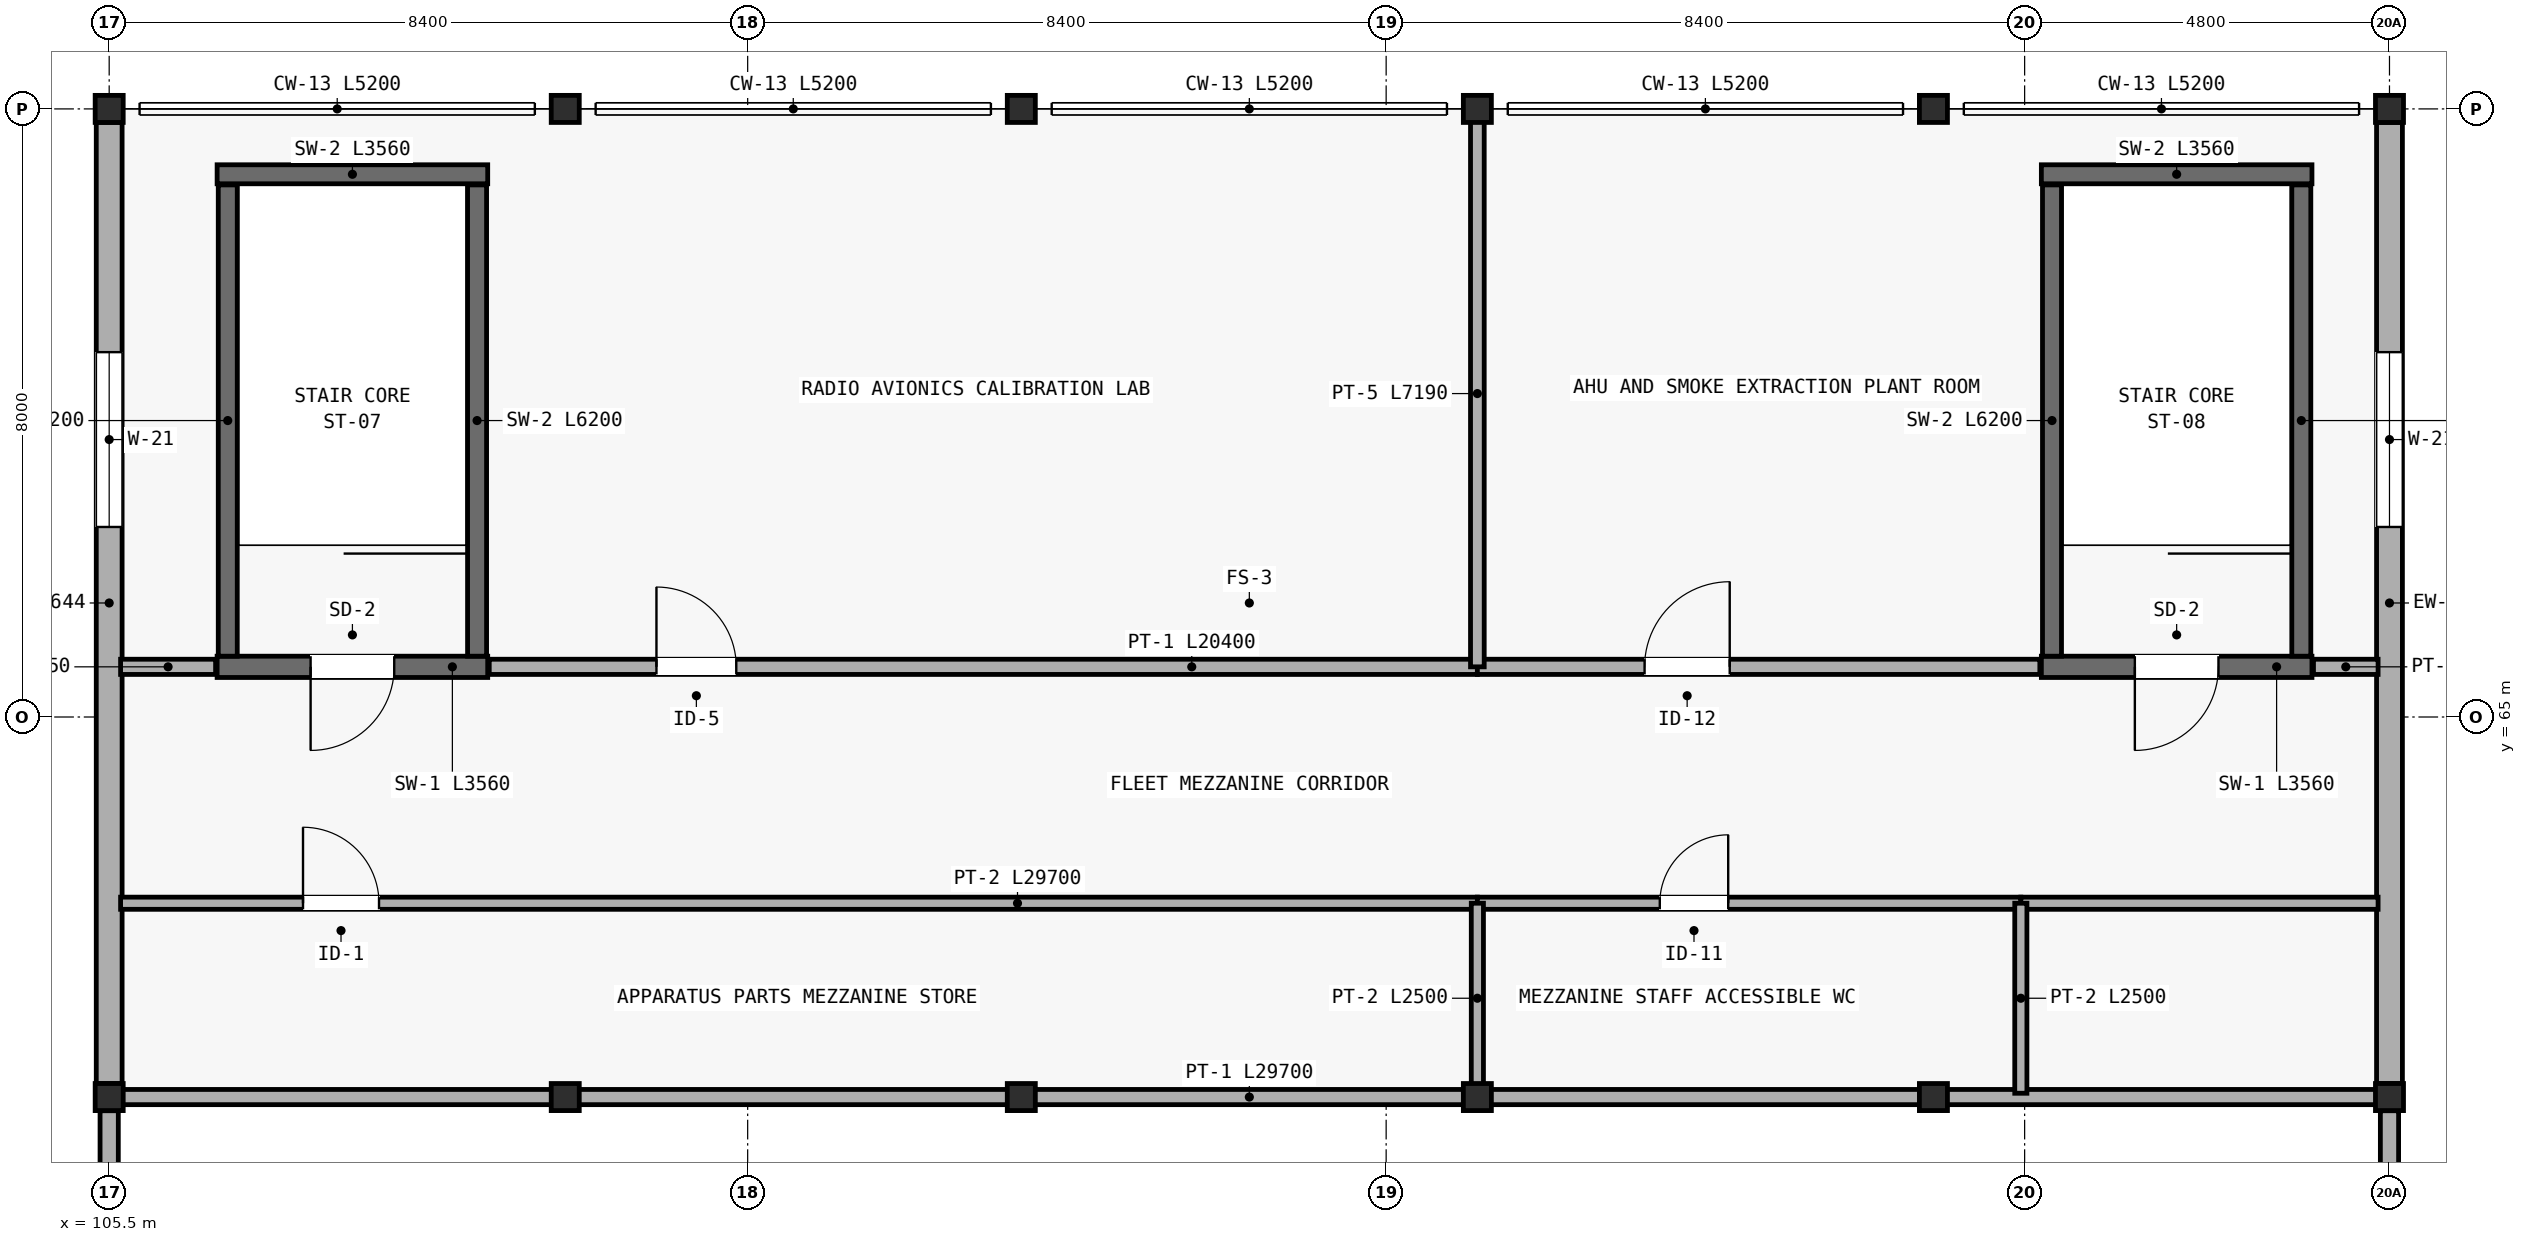
"""IFC4 building model, lengths in metres.
Left out: names, types, materials, properties, quantities, classifications, styles, units other than length and angle.
Written with IfcOpenShell. Run it as: python <this file> out.ifc"""

import sys

from ifc_helpers import new_model, si_unit, direction, frame, frame_2d, origin, origin_2d, place, context, subcontext, project, spatial, rectangle, i_section, extrude, element, fill, save


model = new_model("IFC4")
c1 = context("Model", 3, precision=1e-05, world=origin(), true_north=direction((0.0, 1.0)))
c2 = subcontext(c1, "Body", "Model", "MODEL_VIEW")
j1 = project(units=[si_unit("LENGTHUNIT", "METRE"), si_unit("PLANEANGLEUNIT", "RADIAN")], contexts=[c1])
p1 = place(None, origin())
s1 = spatial("IfcSite", under=j1, at=p1, CompositionType="ELEMENT")
p2 = place(p1, origin())
s2 = spatial("IfcBuilding", under=s1, at=p2, CompositionType="ELEMENT")
p3 = place(p2, frame((0.0, 0.0, 5.85)))
s3 = spatial("IfcBuildingStorey", under=s2, at=p3, CompositionType="ELEMENT", Elevation=5.85)
for number, where, z_axis, x_axis in (
    (1, (105.5, 60.0, 0.0), (0.0, 0.0, 1.0), (1.0, 0.0, 0.0)),
    (2, (105.5, 73.0, 0.0), (0.0, 0.0, 1.0), (1.0, 0.0, 0.0)),
    (3, (111.5, 60.0, 0.0), (0.0, 0.0, 1.0), (1.0, 0.0, 0.0)),
    (4, (111.5, 73.0, 0.0), (0.0, 0.0, 1.0), (1.0, 0.0, 0.0)),
    (5, (117.5, 60.0, 0.0), (0.0, 0.0, 1.0), (1.0, 0.0, 0.0)),
    (6, (117.5, 73.0, 0.0), (0.0, 0.0, 1.0), (1.0, 0.0, 0.0)),
    (7, (123.5, 60.0, 0.0), (0.0, 0.0, 1.0), (1.0, 0.0, 0.0)),
    (8, (123.5, 73.0, 0.0), (0.0, 0.0, 1.0), (1.0, 0.0, 0.0)),
    (9, (129.5, 60.0, 0.0), (0.0, 0.0, 1.0), (1.0, 0.0, 0.0)),
    (10, (129.5, 73.0, 0.0), (0.0, 0.0, 1.0), (1.0, 0.0, 0.0)),
    (11, (135.5, 60.0, 0.0), (0.0, 0.0, 1.0), (1.0, 0.0, 0.0)),
    (12, (135.5, 73.0, 0.0), (0.0, 0.0, 1.0), (1.0, 0.0, 0.0)),
):
    element("IfcColumn", number, at=place(p3, frame(where, z_axis=z_axis, x_axis=x_axis)), inside=s3, PredefinedType="COLUMN", context=c2, shape_type="SweptSolid", body=[
        extrude(i_section(OverallWidth=0.369, OverallDepth=0.356, WebThickness=0.011, FlangeThickness=0.018, FilletRadius=0.015, at=origin_2d()), origin(), (0.0, 0.0, 1.0), 3.45),
    ])
p4 = place(p3, frame((105.5, 48.18, -0.25), z_axis=(0.0, 0.0, 1.0), x_axis=(0.0, 1.0, 0.0)))
e13 = element("IfcWall", 13, at=p4, inside=s3, PredefinedType="STANDARD", context=c2, shape_type="SweptSolid", body=[
    extrude(rectangle(XDim=11.64, YDim=0.24, at=frame_2d((5.82, 0.0))), origin(), (0.0, 0.0, 1.0), 1.8),
])
p5 = place(p3, frame((105.5, 60.178, 0.0), z_axis=(0.0, 0.0, 1.0), x_axis=(0.0, 1.0, 0.0)))
e14 = element("IfcWall", 14, at=p5, inside=s3, PredefinedType="STANDARD", context=c2, shape_type="SweptSolid", body=[
    extrude(rectangle(XDim=12.644, YDim=0.34, at=frame_2d((6.322, 0.0))), origin(), (0.0, 0.0, 1.0), 2.419),
])
p6 = place(p5, frame((7.322, 0.0, 0.8)))
e15 = element("IfcOpeningElement", 15, at=p6, cuts=e14, PredefinedType="OPENING", context=c2, shape_type="SweptSolid", body=[
    extrude(rectangle(XDim=2.3, YDim=1.35, at=frame_2d((1.15, 0.675))), frame((0.0, 0.18, 0.0), z_axis=(0.0, -1.0, 0.0), x_axis=(1.0, 0.0, 0.0)), (0.0, 0.0, 1.0), 0.36),
])
p7 = place(p3, frame((135.5, 48.18, -0.25), z_axis=(0.0, 0.0, 1.0), x_axis=(0.0, 1.0, 0.0)))
e16 = element("IfcWall", 16, at=p7, inside=s3, PredefinedType="STANDARD", context=c2, shape_type="SweptSolid", body=[
    extrude(rectangle(XDim=11.64, YDim=0.24, at=frame_2d((5.82, 0.0))), origin(), (0.0, 0.0, 1.0), 1.8),
])
p8 = place(p3, frame((135.5, 60.178, 0.0), z_axis=(0.0, 0.0, 1.0), x_axis=(0.0, 1.0, 0.0)))
e17 = element("IfcWall", 17, at=p8, inside=s3, PredefinedType="STANDARD", context=c2, shape_type="SweptSolid", body=[
    extrude(rectangle(XDim=12.644, YDim=0.34, at=frame_2d((6.322, 0.0))), origin(), (0.0, 0.0, 1.0), 2.419),
])
p9 = place(p8, frame((7.322, 0.0, 0.8)))
e18 = element("IfcOpeningElement", 18, at=p9, cuts=e17, PredefinedType="OPENING", context=c2, shape_type="SweptSolid", body=[
    extrude(rectangle(XDim=2.3, YDim=1.35, at=frame_2d((1.15, 0.675))), frame((0.0, 0.18, 0.0), z_axis=(0.0, -1.0, 0.0), x_axis=(1.0, 0.0, 0.0)), (0.0, 0.0, 1.0), 0.36),
])
p10 = place(p3, frame((110.48, 65.66, 0.0), z_axis=(0.0, 0.0, 1.0), x_axis=(-1.0, 0.0, 0.0)))
e19 = element("IfcWall", 19, at=p10, inside=s3, PredefinedType="SHEAR", context=c2, shape_type="SweptSolid", body=[
    extrude(rectangle(XDim=3.56, YDim=0.28, at=frame_2d((1.78, 0.0))), origin(), (0.0, 0.0, 1.0), 3.1),
])
p11 = place(p10, frame((1.23, 0.0, 0.0)))
e20 = element("IfcOpeningElement", 20, at=p11, cuts=e19, PredefinedType="OPENING", context=c2, shape_type="SweptSolid", body=[
    extrude(rectangle(XDim=1.1, YDim=2.15, at=frame_2d((0.55, 1.075))), frame((0.0, 0.15, 0.0), z_axis=(0.0, -1.0, 0.0), x_axis=(1.0, 0.0, 0.0)), (0.0, 0.0, 1.0), 0.3),
])
p12 = place(p3, frame((106.92, 72.14, 0.0), z_axis=(0.0, 0.0, 1.0), x_axis=(1.0, 0.0, 0.0)))
e21 = element("IfcWall", 21, at=p12, inside=s3, PredefinedType="SHEAR", context=c2, shape_type="SweptSolid", body=[
    extrude(rectangle(XDim=3.56, YDim=0.25, at=frame_2d((1.78, 0.0))), origin(), (0.0, 0.0, 1.0), 3.1),
])
for number, where, z_axis, x_axis in (
    (22, (110.34, 65.8, 0.0), (0.0, 0.0, 1.0), (0.0, 1.0, 0.0)),
    (23, (107.06, 72.0, 0.0), (0.0, 0.0, 1.0), (0.0, -1.0, 0.0)),
):
    element("IfcWall", number, at=place(p3, frame(where, z_axis=z_axis, x_axis=x_axis)), inside=s3, PredefinedType="SHEAR", context=c2, shape_type="SweptSolid", body=[
        extrude(rectangle(XDim=6.2, YDim=0.25, at=frame_2d((3.1, 0.0))), origin(), (0.0, 0.0, 1.0), 3.1),
    ])
p13 = place(p3, frame((134.48, 65.66, 0.0), z_axis=(0.0, 0.0, 1.0), x_axis=(-1.0, 0.0, 0.0)))
e24 = element("IfcWall", 24, at=p13, inside=s3, PredefinedType="SHEAR", context=c2, shape_type="SweptSolid", body=[
    extrude(rectangle(XDim=3.56, YDim=0.28, at=frame_2d((1.78, 0.0))), origin(), (0.0, 0.0, 1.0), 3.1),
])
p14 = place(p13, frame((1.23, 0.0, 0.0)))
e25 = element("IfcOpeningElement", 25, at=p14, cuts=e24, PredefinedType="OPENING", context=c2, shape_type="SweptSolid", body=[
    extrude(rectangle(XDim=1.1, YDim=2.15, at=frame_2d((0.55, 1.075))), frame((0.0, 0.15, 0.0), z_axis=(0.0, -1.0, 0.0), x_axis=(1.0, 0.0, 0.0)), (0.0, 0.0, 1.0), 0.3),
])
p15 = place(p3, frame((130.92, 72.14, 0.0), z_axis=(0.0, 0.0, 1.0), x_axis=(1.0, 0.0, 0.0)))
e26 = element("IfcWall", 26, at=p15, inside=s3, PredefinedType="SHEAR", context=c2, shape_type="SweptSolid", body=[
    extrude(rectangle(XDim=3.56, YDim=0.25, at=frame_2d((1.78, 0.0))), origin(), (0.0, 0.0, 1.0), 3.1),
])
for number, where, z_axis, x_axis in (
    (27, (134.34, 65.8, 0.0), (0.0, 0.0, 1.0), (0.0, 1.0, 0.0)),
    (28, (131.06, 72.0, 0.0), (0.0, 0.0, 1.0), (0.0, -1.0, 0.0)),
):
    element("IfcWall", number, at=place(p3, frame(where, z_axis=z_axis, x_axis=x_axis)), inside=s3, PredefinedType="SHEAR", context=c2, shape_type="SweptSolid", body=[
        extrude(rectangle(XDim=6.2, YDim=0.25, at=frame_2d((3.1, 0.0))), origin(), (0.0, 0.0, 1.0), 3.1),
    ])
p16 = place(p3, frame((105.65, 60.0, 0.0), z_axis=(0.0, 0.0, 1.0), x_axis=(1.0, 0.0, 0.0)))
e29 = element("IfcWall", 29, at=p16, inside=s3, PredefinedType="PARTITIONING", context=c2, shape_type="SweptSolid", body=[
    extrude(rectangle(XDim=29.7, YDim=0.2, at=frame_2d((14.85, 0.0))), origin(), (0.0, 0.0, 1.0), 2.348),
])
p17 = place(p3, frame((105.65, 62.55, 0.0), z_axis=(0.0, 0.0, 1.0), x_axis=(1.0, 0.0, 0.0)))
e30 = element("IfcWall", 30, at=p17, inside=s3, PredefinedType="PARTITIONING", context=c2, shape_type="SweptSolid", body=[
    extrude(rectangle(XDim=17.85, YDim=0.16, at=frame_2d((8.925, 0.0))), origin(), (0.0, 0.0, 1.0), 2.55),
])
p18 = place(p17, frame((2.4, 0.0, 0.0)))
e31 = element("IfcOpeningElement", 31, at=p18, cuts=e30, PredefinedType="OPENING", context=c2, shape_type="SweptSolid", body=[
    extrude(rectangle(XDim=1.0, YDim=2.12, at=frame_2d((0.5, 1.06))), frame((0.0, 0.09, 0.0), z_axis=(0.0, -1.0, 0.0), x_axis=(1.0, 0.0, 0.0)), (0.0, 0.0, 1.0), 0.18),
])
p19 = place(p3, frame((123.5, 62.55, 0.0), z_axis=(0.0, 0.0, 1.0), x_axis=(1.0, 0.0, 0.0)))
e32 = element("IfcWall", 32, at=p19, inside=s3, PredefinedType="PARTITIONING", context=c2, shape_type="SweptSolid", body=[
    extrude(rectangle(XDim=7.15, YDim=0.16, at=frame_2d((3.575, 0.0))), origin(), (0.0, 0.0, 1.0), 2.55),
])
p20 = place(p19, frame((2.4, 0.0, 0.0)))
e33 = element("IfcOpeningElement", 33, at=p20, cuts=e32, PredefinedType="OPENING", context=c2, shape_type="SweptSolid", body=[
    extrude(rectangle(XDim=0.9, YDim=2.08, at=frame_2d((0.45, 1.04))), frame((0.0, 0.09, 0.0), z_axis=(0.0, -1.0, 0.0), x_axis=(1.0, 0.0, 0.0)), (0.0, 0.0, 1.0), 0.18),
])
p21 = place(p3, frame((130.65, 62.55, 0.0), z_axis=(0.0, 0.0, 1.0), x_axis=(1.0, 0.0, 0.0)))
e34 = element("IfcWall", 34, at=p21, inside=s3, PredefinedType="PARTITIONING", context=c2, shape_type="SweptSolid", body=[
    extrude(rectangle(XDim=4.7, YDim=0.16, at=frame_2d((2.35, 0.0))), origin(), (0.0, 0.0, 1.0), 2.55),
])
p22 = place(p3, frame((123.5, 60.05, 0.0), z_axis=(0.0, 0.0, 1.0), x_axis=(0.0, 1.0, 0.0)))
e35 = element("IfcWall", 35, at=p22, inside=s3, PredefinedType="PARTITIONING", context=c2, shape_type="SweptSolid", body=[
    extrude(rectangle(XDim=2.5, YDim=0.16, at=frame_2d((1.25, 0.0))), origin(), (0.0, 0.0, 1.0), 2.419),
])
p23 = place(p3, frame((130.65, 60.05, 0.0), z_axis=(0.0, 0.0, 1.0), x_axis=(0.0, 1.0, 0.0)))
e36 = element("IfcWall", 36, at=p23, inside=s3, PredefinedType="PARTITIONING", context=c2, shape_type="SweptSolid", body=[
    extrude(rectangle(XDim=2.5, YDim=0.16, at=frame_2d((1.25, 0.0))), origin(), (0.0, 0.0, 1.0), 2.55),
])
p24 = place(p3, frame((105.65, 65.66, 0.0), z_axis=(0.0, 0.0, 1.0), x_axis=(1.0, 0.0, 0.0)))
e37 = element("IfcWall", 37, at=p24, inside=s3, PredefinedType="PARTITIONING", context=c2, shape_type="SweptSolid", body=[
    extrude(rectangle(XDim=1.25, YDim=0.2, at=frame_2d((0.625, 0.0))), origin(), (0.0, 0.0, 1.0), 2.55),
])
p25 = place(p3, frame((110.5, 65.66, 0.0), z_axis=(0.0, 0.0, 1.0), x_axis=(1.0, 0.0, 0.0)))
e38 = element("IfcWall", 38, at=p25, inside=s3, PredefinedType="PARTITIONING", context=c2, shape_type="SweptSolid", body=[
    extrude(rectangle(XDim=13.0, YDim=0.2, at=frame_2d((6.5, 0.0))), origin(), (0.0, 0.0, 1.0), 2.55),
])
p26 = place(p25, frame((2.2, 0.0, 0.0)))
e39 = element("IfcOpeningElement", 39, at=p26, cuts=e38, PredefinedType="OPENING", context=c2, shape_type="SweptSolid", body=[
    extrude(rectangle(XDim=1.05, YDim=2.14, at=frame_2d((0.525, 1.07))), frame((0.0, 0.11, 0.0), z_axis=(0.0, -1.0, 0.0), x_axis=(1.0, 0.0, 0.0)), (0.0, 0.0, 1.0), 0.22),
])
p27 = place(p3, frame((123.5, 65.66, 0.0), z_axis=(0.0, 0.0, 1.0), x_axis=(1.0, 0.0, 0.0)))
e40 = element("IfcWall", 40, at=p27, inside=s3, PredefinedType="PARTITIONING", context=c2, shape_type="SweptSolid", body=[
    extrude(rectangle(XDim=7.4, YDim=0.2, at=frame_2d((3.7, 0.0))), origin(), (0.0, 0.0, 1.0), 2.55),
])
p28 = place(p27, frame((2.2, 0.0, 0.0)))
e41 = element("IfcOpeningElement", 41, at=p28, cuts=e40, PredefinedType="OPENING", context=c2, shape_type="SweptSolid", body=[
    extrude(rectangle(XDim=1.12, YDim=2.15, at=frame_2d((0.56, 1.075))), frame((0.0, 0.11, 0.0), z_axis=(0.0, -1.0, 0.0), x_axis=(1.0, 0.0, 0.0)), (0.0, 0.0, 1.0), 0.22),
])
p29 = place(p3, frame((134.5, 65.66, 0.0), z_axis=(0.0, 0.0, 1.0), x_axis=(1.0, 0.0, 0.0)))
e42 = element("IfcWall", 42, at=p29, inside=s3, PredefinedType="PARTITIONING", context=c2, shape_type="SweptSolid", body=[
    extrude(rectangle(XDim=0.85, YDim=0.2, at=frame_2d((0.425, 0.0))), origin(), (0.0, 0.0, 1.0), 2.55),
])
p30 = place(p3, frame((123.5, 65.66, 0.0), z_axis=(0.0, 0.0, 1.0), x_axis=(0.0, 1.0, 0.0)))
e43 = element("IfcWall", 43, at=p30, inside=s3, PredefinedType="PARTITIONING", context=c2, shape_type="SweptSolid", body=[
    extrude(rectangle(XDim=7.19, YDim=0.18, at=frame_2d((3.595, 0.0))), origin(), (0.0, 0.0, 1.0), 2.419),
])
p31 = place(p6, origin())
e44 = element("IfcWindow", 44, at=p31, inside=s3, PartitioningType="TRIPLE_PANEL_VERTICAL", PredefinedType="WINDOW", context=c2, shape_type="SweptSolid", body=[
    extrude(rectangle(XDim=2.3, YDim=1.35, at=frame_2d((1.15, 0.675))), frame((0.0, 0.03, 0.0), z_axis=(0.0, -1.0, 0.0), x_axis=(1.0, 0.0, 0.0)), (0.0, 0.0, 1.0), 0.06),
])
fill(e15, e44)
p32 = place(p9, origin())
e45 = element("IfcWindow", 45, at=p32, inside=s3, PartitioningType="TRIPLE_PANEL_VERTICAL", PredefinedType="WINDOW", context=c2, shape_type="SweptSolid", body=[
    extrude(rectangle(XDim=2.3, YDim=1.35, at=frame_2d((1.15, 0.675))), frame((0.0, 0.03, 0.0), z_axis=(0.0, -1.0, 0.0), x_axis=(1.0, 0.0, 0.0)), (0.0, 0.0, 1.0), 0.06),
])
fill(e18, e45)
p33 = place(p11, origin())
e46 = element("IfcDoor", 46, at=p33, inside=s3, OperationType="SINGLE_SWING_RIGHT", PredefinedType="DOOR", context=c2, shape_type="SweptSolid", body=[
    extrude(rectangle(XDim=1.1, YDim=2.15, at=frame_2d((0.55, 1.075))), frame((0.0, 0.025, 0.0), z_axis=(0.0, -1.0, 0.0), x_axis=(1.0, 0.0, 0.0)), (0.0, 0.0, 1.0), 0.05),
])
fill(e20, e46)
p34 = place(p14, origin())
e47 = element("IfcDoor", 47, at=p34, inside=s3, OperationType="SINGLE_SWING_RIGHT", PredefinedType="DOOR", context=c2, shape_type="SweptSolid", body=[
    extrude(rectangle(XDim=1.1, YDim=2.15, at=frame_2d((0.55, 1.075))), frame((0.0, 0.025, 0.0), z_axis=(0.0, -1.0, 0.0), x_axis=(1.0, 0.0, 0.0)), (0.0, 0.0, 1.0), 0.05),
])
fill(e25, e47)
p35 = place(p18, origin())
e48 = element("IfcDoor", 48, at=p35, inside=s3, OperationType="SINGLE_SWING_LEFT", PredefinedType="DOOR", context=c2, shape_type="SweptSolid", body=[
    extrude(rectangle(XDim=1.0, YDim=2.12, at=frame_2d((0.5, 1.06))), frame((0.0, 0.025, 0.0), z_axis=(0.0, -1.0, 0.0), x_axis=(1.0, 0.0, 0.0)), (0.0, 0.0, 1.0), 0.05),
])
fill(e31, e48)
p36 = place(p20, origin())
e49 = element("IfcDoor", 49, at=p36, inside=s3, OperationType="SINGLE_SWING_RIGHT", PredefinedType="DOOR", context=c2, shape_type="SweptSolid", body=[
    extrude(rectangle(XDim=0.9, YDim=2.08, at=frame_2d((0.45, 1.04))), frame((0.0, 0.025, 0.0), z_axis=(0.0, -1.0, 0.0), x_axis=(1.0, 0.0, 0.0)), (0.0, 0.0, 1.0), 0.05),
])
fill(e33, e49)
p37 = place(p26, origin())
e50 = element("IfcDoor", 50, at=p37, inside=s3, OperationType="SINGLE_SWING_LEFT", PredefinedType="DOOR", context=c2, shape_type="SweptSolid", body=[
    extrude(rectangle(XDim=1.05, YDim=2.14, at=frame_2d((0.525, 1.07))), frame((0.0, 0.025, 0.0), z_axis=(0.0, -1.0, 0.0), x_axis=(1.0, 0.0, 0.0)), (0.0, 0.0, 1.0), 0.05),
])
fill(e39, e50)
p38 = place(p28, origin())
e51 = element("IfcDoor", 51, at=p38, inside=s3, OperationType="SINGLE_SWING_RIGHT", PredefinedType="DOOR", context=c2, shape_type="SweptSolid", body=[
    extrude(rectangle(XDim=1.12, YDim=2.15, at=frame_2d((0.56, 1.075))), frame((0.0, 0.025, 0.0), z_axis=(0.0, -1.0, 0.0), x_axis=(1.0, 0.0, 0.0)), (0.0, 0.0, 1.0), 0.05),
])
fill(e41, e51)
save(model, sys.argv[1])
